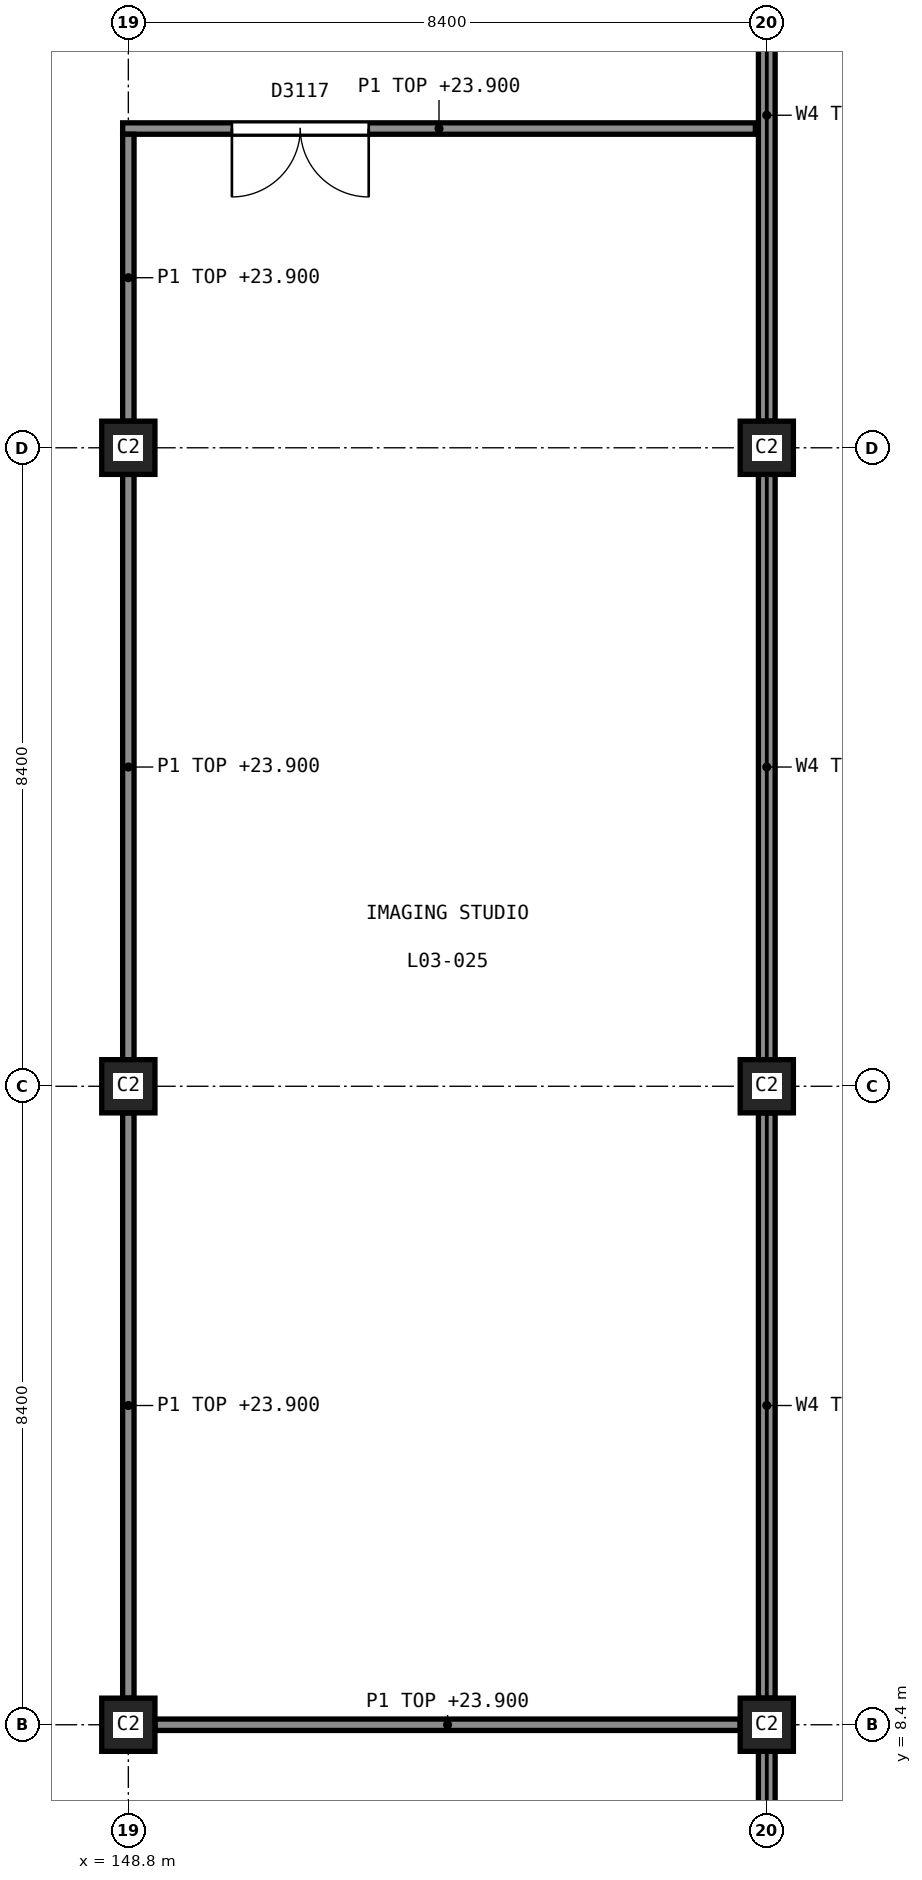
"""IFC4 building model, lengths in metres.
Left out: names, types, materials, properties, quantities, classifications, styles, units other than length and angle.
Written with IfcOpenShell. Run it as: python <this file> out.ifc"""

import sys

from ifc_helpers import new_model, si_unit, direction, frame, frame_2d, origin, origin_2d, place, context, subcontext, project, spatial, rectangle, extrude, element, fill, save


model = new_model("IFC4")
c1 = context("Model", 3, precision=1e-05, world=origin(), true_north=direction((0.0, 1.0)))
c2 = subcontext(c1, "Body", "Model", "MODEL_VIEW")
j1 = project(units=[si_unit("LENGTHUNIT", "METRE"), si_unit("PLANEANGLEUNIT", "RADIAN")], contexts=[c1])
p1 = place(None, origin())
s1 = spatial("IfcSite", under=j1, at=p1, CompositionType="ELEMENT")
p2 = place(p1, origin())
s2 = spatial("IfcBuilding", under=s1, at=p2, CompositionType="ELEMENT")
p3 = place(p2, frame((0.0, 0.0, 20.0)))
s3 = spatial("IfcBuildingStorey", under=s2, at=p3, CompositionType="ELEMENT", Elevation=20.0)
for number, where, z_axis, x_axis in (
    (1, (148.8, 8.4, 0.0), (0.0, 0.0, 1.0), (1.0, 0.0, 0.0)),
    (2, (148.8, 16.8, 0.0), (0.0, 0.0, 1.0), (1.0, 0.0, 0.0)),
    (3, (148.8, 25.2, 0.0), (0.0, 0.0, 1.0), (1.0, 0.0, 0.0)),
    (4, (157.2, 8.4, 0.0), (0.0, 0.0, 1.0), (1.0, 0.0, 0.0)),
    (5, (157.2, 16.8, 0.0), (0.0, 0.0, 1.0), (1.0, 0.0, 0.0)),
    (6, (157.2, 25.2, 0.0), (0.0, 0.0, 1.0), (1.0, 0.0, 0.0)),
):
    element("IfcColumn", number, at=place(p3, frame(where, z_axis=z_axis, x_axis=x_axis)), inside=s3, PredefinedType="COLUMN", context=c2, shape_type="SweptSolid", body=[
        extrude(rectangle(XDim=0.7, YDim=0.7, at=origin_2d()), origin(), (0.0, 0.0, 1.0), 5.0),
    ])
for number, where, z_axis, x_axis in (
    (7, (157.2, 0.35, 0.0), (0.0, 0.0, 1.0), (0.0, 1.0, 0.0)),
    (8, (157.2, 8.75, 0.0), (0.0, 0.0, 1.0), (0.0, 1.0, 0.0)),
):
    element("IfcWall", number, at=place(p3, frame(where, z_axis=z_axis, x_axis=x_axis)), inside=s3, PredefinedType="SOLIDWALL", context=c2, shape_type="SweptSolid", body=[
        extrude(rectangle(XDim=7.7, YDim=0.22, at=frame_2d((3.85, 0.0))), origin(), (0.0, 0.0, 1.0), 3.94),
    ])
p4 = place(p3, frame((157.2, 17.15, 0.0), z_axis=(0.0, 0.0, 1.0), x_axis=(0.0, 1.0, 0.0)))
e9 = element("IfcWall", 9, at=p4, inside=s3, PredefinedType="SOLIDWALL", context=c2, shape_type="SweptSolid", body=[
    extrude(rectangle(XDim=7.7, YDim=0.22, at=frame_2d((3.85, 0.0))), origin(), (0.0, 0.0, 1.0), 3.94),
])
p5 = place(p3, frame((157.2, 25.55, 0.0), z_axis=(0.0, 0.0, 1.0), x_axis=(0.0, 1.0, 0.0)))
e10 = element("IfcWall", 10, at=p5, inside=s3, PredefinedType="SOLIDWALL", context=c2, shape_type="SweptSolid", body=[
    extrude(rectangle(XDim=8.05, YDim=0.22, at=frame_2d((4.025, 0.0))), origin(), (0.0, 0.0, 1.0), 3.94),
])
p6 = place(p3, frame((148.725, 29.4, 0.0), z_axis=(0.0, 0.0, 1.0), x_axis=(1.0, 0.0, 0.0)))
e11 = element("IfcWall", 11, at=p6, inside=s3, PredefinedType="PARTITIONING", context=c2, shape_type="SweptSolid", body=[
    extrude(rectangle(XDim=8.325, YDim=0.15, at=frame_2d((4.163, 0.0))), origin(), (0.0, 0.0, 1.0), 3.9),
])
p7 = place(p6, frame((1.438, 0.0, 0.0)))
e12 = element("IfcOpeningElement", 12, at=p7, cuts=e11, PredefinedType="OPENING", context=c2, shape_type="SweptSolid", body=[
    extrude(rectangle(XDim=1.8, YDim=2.1, at=frame_2d((0.9, 1.05))), frame((0.0, 0.085, 0.0), z_axis=(0.0, -1.0, 0.0), x_axis=(1.0, 0.0, 0.0)), (0.0, 0.0, 1.0), 0.17),
])
p8 = place(p3, frame((149.15, 8.4, 0.0), z_axis=(0.0, 0.0, 1.0), x_axis=(1.0, 0.0, 0.0)))
e13 = element("IfcWall", 13, at=p8, inside=s3, PredefinedType="PARTITIONING", context=c2, shape_type="SweptSolid", body=[
    extrude(rectangle(XDim=7.7, YDim=0.15, at=frame_2d((3.85, 0.0))), origin(), (0.0, 0.0, 1.0), 3.9),
])
p9 = place(p3, frame((148.8, 8.75, 0.0), z_axis=(0.0, 0.0, 1.0), x_axis=(0.0, 1.0, 0.0)))
e14 = element("IfcWall", 14, at=p9, inside=s3, PredefinedType="PARTITIONING", context=c2, shape_type="SweptSolid", body=[
    extrude(rectangle(XDim=7.7, YDim=0.15, at=frame_2d((3.85, 0.0))), origin(), (0.0, 0.0, 1.0), 3.9),
])
p10 = place(p3, frame((148.8, 17.15, 0.0), z_axis=(0.0, 0.0, 1.0), x_axis=(0.0, 1.0, 0.0)))
e15 = element("IfcWall", 15, at=p10, inside=s3, PredefinedType="PARTITIONING", context=c2, shape_type="SweptSolid", body=[
    extrude(rectangle(XDim=7.7, YDim=0.15, at=frame_2d((3.85, 0.0))), origin(), (0.0, 0.0, 1.0), 3.9),
])
p11 = place(p3, frame((148.8, 25.55, 0.0), z_axis=(0.0, 0.0, 1.0), x_axis=(0.0, 1.0, 0.0)))
e16 = element("IfcWall", 16, at=p11, inside=s3, PredefinedType="PARTITIONING", context=c2, shape_type="SweptSolid", body=[
    extrude(rectangle(XDim=3.775, YDim=0.15, at=frame_2d((1.887, 0.0))), origin(), (0.0, 0.0, 1.0), 3.9),
])
p12 = place(p7, origin())
e17 = element("IfcDoor", 17, at=p12, inside=s3, OperationType="DOUBLE_DOOR_SINGLE_SWING", PredefinedType="DOOR", context=c2, shape_type="SweptSolid", body=[
    extrude(rectangle(XDim=1.8, YDim=2.1, at=frame_2d((0.9, 1.05))), frame((0.0, 0.025, 0.0), z_axis=(0.0, -1.0, 0.0), x_axis=(1.0, 0.0, 0.0)), (0.0, 0.0, 1.0), 0.05),
])
fill(e12, e17)
save(model, sys.argv[1])
